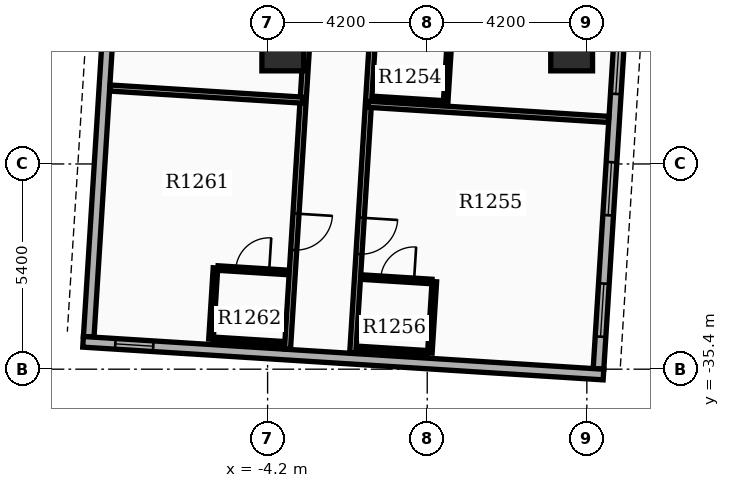
"""IFC4 building model, lengths in metres.
Left out: names, types, materials, properties, quantities, classifications, styles, units other than length and angle.
Written with IfcOpenShell. Run it as: python <this file> out.ifc"""

import sys

from ifc_helpers import new_model, si_unit, direction, frame, frame_2d, origin, origin_2d, place, context, subcontext, project, spatial, rectangle, extrude, element, fill, save


model = new_model("IFC4")
c1 = context("Model", 3, precision=1e-05, world=origin(), true_north=direction((0.0, 1.0)))
c2 = subcontext(c1, "Body", "Model", "MODEL_VIEW")
j1 = project(units=[si_unit("LENGTHUNIT", "METRE"), si_unit("PLANEANGLEUNIT", "RADIAN")], contexts=[c1])
p1 = place(None, origin())
s1 = spatial("IfcSite", under=j1, at=p1, CompositionType="ELEMENT")
p2 = place(p1, origin())
s2 = spatial("IfcBuilding", under=s1, at=p2, CompositionType="ELEMENT")
p3 = place(p2, frame((0.0, 0.0, 79.5)))
s3 = spatial("IfcBuildingStorey", under=s2, at=p3, CompositionType="ELEMENT", Elevation=79.5)
for number, where, z_axis, x_axis in (
    (1, (-3.8, -27.0, 0.0), (0.0, 0.0, 1.0), (1.0, 0.0, 0.0)),
    (2, (3.8, -27.0, 0.0), (0.0, 0.0, 1.0), (1.0, 0.0, 0.0)),
):
    element("IfcColumn", number, at=place(p3, frame(where, z_axis=z_axis, x_axis=x_axis)), inside=s3, PredefinedType="COLUMN", context=c2, shape_type="SweptSolid", body=[
        extrude(rectangle(XDim=1.1, YDim=1.1, at=origin_2d()), origin(), (0.0, 0.0, 1.0), 3.9),
    ])
p4 = place(p3, frame((-7.645, -14.489, 0.0), z_axis=(0.0, 0.0, 1.0), x_axis=(-0.06279645424, -0.99802635503, 0.0)))
e3 = element("IfcWall", 3, at=p4, inside=s3, PredefinedType="STANDARD", context=c2, shape_type="SweptSolid", body=[
    extrude(rectangle(XDim=20.1, YDim=0.28, at=frame_2d((10.05, 0.0))), origin(), (0.0, 0.0, 1.0), 2.91),
])
p5 = place(p4, frame((0.85, 0.0, 0.8)))
e4 = element("IfcOpeningElement", 4, at=p5, cuts=e3, PredefinedType="OPENING", context=c2, shape_type="SweptSolid", body=[
    extrude(rectangle(XDim=1.4, YDim=1.6, at=frame_2d((0.7, 0.8))), frame((0.0, 0.15, 0.0), z_axis=(0.0, -1.0, 0.0), x_axis=(1.0, 0.0, 0.0)), (0.0, 0.0, 1.0), 0.3),
])
p6 = place(p4, frame((4.05, 0.0, 0.8)))
e5 = element("IfcOpeningElement", 5, at=p6, cuts=e3, PredefinedType="OPENING", context=c2, shape_type="SweptSolid", body=[
    extrude(rectangle(XDim=1.4, YDim=1.6, at=frame_2d((0.7, 0.8))), frame((0.0, 0.15, 0.0), z_axis=(0.0, -1.0, 0.0), x_axis=(1.0, 0.0, 0.0)), (0.0, 0.0, 1.0), 0.3),
])
p7 = place(p4, frame((7.25, 0.0, 0.8)))
e6 = element("IfcOpeningElement", 6, at=p7, cuts=e3, PredefinedType="OPENING", context=c2, shape_type="SweptSolid", body=[
    extrude(rectangle(XDim=1.4, YDim=1.6, at=frame_2d((0.7, 0.8))), frame((0.0, 0.15, 0.0), z_axis=(0.0, -1.0, 0.0), x_axis=(1.0, 0.0, 0.0)), (0.0, 0.0, 1.0), 0.3),
])
p8 = place(p4, frame((10.45, 0.0, 0.8)))
e7 = element("IfcOpeningElement", 7, at=p8, cuts=e3, PredefinedType="OPENING", context=c2, shape_type="SweptSolid", body=[
    extrude(rectangle(XDim=1.4, YDim=1.6, at=frame_2d((0.7, 0.8))), frame((0.0, 0.15, 0.0), z_axis=(0.0, -1.0, 0.0), x_axis=(1.0, 0.0, 0.0)), (0.0, 0.0, 1.0), 0.3),
])
p9 = place(p3, frame((4.507, -35.393, 0.0), z_axis=(0.0, 0.0, 1.0), x_axis=(0.062784355807, 0.998027116198, 0.0)))
e8 = element("IfcWall", 8, at=p9, inside=s3, PredefinedType="STANDARD", context=c2, shape_type="SweptSolid", body=[
    extrude(rectangle(XDim=20.1, YDim=0.28, at=frame_2d((10.05, 0.0))), origin(), (0.0, 0.0, 1.0), 2.91),
])
p10 = place(p9, frame((0.85, 0.0, 0.8)))
e9 = element("IfcOpeningElement", 9, at=p10, cuts=e8, PredefinedType="OPENING", context=c2, shape_type="SweptSolid", body=[
    extrude(rectangle(XDim=1.4, YDim=1.6, at=frame_2d((0.7, 0.8))), frame((0.0, 0.15, 0.0), z_axis=(0.0, -1.0, 0.0), x_axis=(1.0, 0.0, 0.0)), (0.0, 0.0, 1.0), 0.3),
])
p11 = place(p9, frame((4.05, 0.0, 0.8)))
e10 = element("IfcOpeningElement", 10, at=p11, cuts=e8, PredefinedType="OPENING", context=c2, shape_type="SweptSolid", body=[
    extrude(rectangle(XDim=1.4, YDim=1.6, at=frame_2d((0.7, 0.8))), frame((0.0, 0.15, 0.0), z_axis=(0.0, -1.0, 0.0), x_axis=(1.0, 0.0, 0.0)), (0.0, 0.0, 1.0), 0.3),
])
p12 = place(p9, frame((7.25, 0.0, 0.8)))
e11 = element("IfcOpeningElement", 11, at=p12, cuts=e8, PredefinedType="OPENING", context=c2, shape_type="SweptSolid", body=[
    extrude(rectangle(XDim=1.4, YDim=1.6, at=frame_2d((0.7, 0.8))), frame((0.0, 0.15, 0.0), z_axis=(0.0, -1.0, 0.0), x_axis=(1.0, 0.0, 0.0)), (0.0, 0.0, 1.0), 0.3),
])
p13 = place(p9, frame((10.45, 0.0, 0.8)))
e12 = element("IfcOpeningElement", 12, at=p13, cuts=e8, PredefinedType="OPENING", context=c2, shape_type="SweptSolid", body=[
    extrude(rectangle(XDim=1.4, YDim=1.6, at=frame_2d((0.7, 0.8))), frame((0.0, 0.15, 0.0), z_axis=(0.0, -1.0, 0.0), x_axis=(1.0, 0.0, 0.0)), (0.0, 0.0, 1.0), 0.3),
])
p14 = place(p9, frame((14.035, 0.0, 0.85)))
e13 = element("IfcOpeningElement", 13, at=p14, cuts=e8, PredefinedType="OPENING", context=c2, shape_type="SweptSolid", body=[
    extrude(rectangle(XDim=1.2, YDim=1.6, at=frame_2d((0.6, 0.8))), frame((0.0, 0.15, 0.0), z_axis=(0.0, -1.0, 0.0), x_axis=(1.0, 0.0, 0.0)), (0.0, 0.0, 1.0), 0.3),
])
p15 = place(p3, frame((-9.055, -34.68, 0.0), z_axis=(0.0, 0.0, 1.0), x_axis=(0.998026318072, -0.062797041623, 0.0)))
e14 = element("IfcWall", 14, at=p15, inside=s3, PredefinedType="STANDARD", context=c2, shape_type="SweptSolid", body=[
    extrude(rectangle(XDim=13.72, YDim=0.28, at=frame_2d((6.86, 0.0))), origin(), (0.0, 0.0, 1.0), 2.91),
])
p16 = place(p15, frame((0.85, 0.0, 0.85)))
e15 = element("IfcOpeningElement", 15, at=p16, cuts=e14, PredefinedType="OPENING", context=c2, shape_type="SweptSolid", body=[
    extrude(rectangle(XDim=1.0, YDim=1.5, at=frame_2d((0.5, 0.75))), frame((0.0, 0.15, 0.0), z_axis=(0.0, -1.0, 0.0), x_axis=(1.0, 0.0, 0.0)), (0.0, 0.0, 1.0), 0.3),
])
p17 = place(p3, frame((-0.693, -14.836, 0.0), z_axis=(0.0, 0.0, 1.0), x_axis=(-0.062795509413, -0.998026414479, 0.0)))
e16 = element("IfcWall", 16, at=p17, inside=s3, PredefinedType="PARTITIONING", context=c2, shape_type="SweptSolid", body=[
    extrude(rectangle(XDim=20.182, YDim=0.16, at=frame_2d((10.091, 0.0))), origin(), (0.0, 0.0, 1.0), 2.9),
])
p18 = place(p17, frame((0.731, 0.0, 0.0)))
e17 = element("IfcOpeningElement", 17, at=p18, cuts=e16, PredefinedType="OPENING", context=c2, shape_type="SweptSolid", body=[
    extrude(rectangle(XDim=0.96, YDim=2.15, at=frame_2d((0.48, 1.075))), frame((0.0, 0.09, 0.0), z_axis=(0.0, -1.0, 0.0), x_axis=(1.0, 0.0, 0.0)), (0.0, 0.0, 1.0), 0.18),
])
p19 = place(p17, frame((7.896, 0.0, 0.0)))
e18 = element("IfcOpeningElement", 18, at=p19, cuts=e16, PredefinedType="OPENING", context=c2, shape_type="SweptSolid", body=[
    extrude(rectangle(XDim=0.96, YDim=2.15, at=frame_2d((0.48, 1.075))), frame((0.0, 0.09, 0.0), z_axis=(0.0, -1.0, 0.0), x_axis=(1.0, 0.0, 0.0)), (0.0, 0.0, 1.0), 0.18),
])
p20 = place(p17, frame((16.611, 0.0, 0.0)))
e19 = element("IfcOpeningElement", 19, at=p20, cuts=e16, PredefinedType="OPENING", context=c2, shape_type="SweptSolid", body=[
    extrude(rectangle(XDim=0.96, YDim=2.15, at=frame_2d((0.48, 1.075))), frame((0.0, 0.09, 0.0), z_axis=(0.0, -1.0, 0.0), x_axis=(1.0, 0.0, 0.0)), (0.0, 0.0, 1.0), 0.18),
])
p21 = place(p3, frame((-1.548, -28.43, 0.0), z_axis=(0.0, 0.0, 1.0), x_axis=(0.998027895917, -0.062771960074, 0.0)))
e20 = element("IfcWall", 20, at=p21, inside=s3, PredefinedType="PARTITIONING", context=c2, shape_type="SweptSolid", body=[
    extrude(rectangle(XDim=6.332, YDim=0.16, at=frame_2d((3.166, 0.0))), origin(), (0.0, 0.0, 1.0), 2.9),
])
p22 = place(p3, frame((-1.398, -28.279, 0.0), z_axis=(0.0, 0.0, 1.0), x_axis=(0.998027443946, -0.062779145668, 0.0)))
e21 = element("IfcWall", 21, at=p22, inside=s3, PredefinedType="PARTITIONING", context=c2, shape_type="SweptSolid", body=[
    extrude(rectangle(XDim=1.82, YDim=0.12, at=frame_2d((0.91, 0.0))), origin(), (0.0, 0.0, 1.0), 2.9),
])
p23 = place(p3, frame((0.601, -26.521, 0.0), z_axis=(0.0, 0.0, 1.0), x_axis=(-0.062717813936, -0.998031300018, 0.0)))
e22 = element("IfcWall", 22, at=p23, inside=s3, PredefinedType="PARTITIONING", context=c2, shape_type="SweptSolid", body=[
    extrude(rectangle(XDim=1.88, YDim=0.12, at=frame_2d((0.94, 0.0))), origin(), (0.0, 0.0, 1.0), 2.9),
])
p24 = place(p3, frame((-1.694, -32.979, 0.0), z_axis=(0.0, 0.0, 1.0), x_axis=(0.998027443946, -0.062779145668, 0.0)))
e23 = element("IfcWall", 23, at=p24, inside=s3, PredefinedType="PARTITIONING", context=c2, shape_type="SweptSolid", body=[
    extrude(rectangle(XDim=1.82, YDim=0.12, at=frame_2d((0.91, 0.0))), origin(), (0.0, 0.0, 1.0), 2.9),
])
p25 = place(p24, frame((0.47, 0.0, 0.0)))
e24 = element("IfcOpeningElement", 24, at=p25, cuts=e23, PredefinedType="OPENING", context=c2, shape_type="SweptSolid", body=[
    extrude(rectangle(XDim=0.88, YDim=2.1, at=frame_2d((0.44, 1.05))), frame((0.0, 0.07, 0.0), z_axis=(0.0, -1.0, 0.0), x_axis=(1.0, 0.0, 0.0)), (0.0, 0.0, 1.0), 0.14),
])
p26 = place(p3, frame((-1.812, -34.855, 0.0), z_axis=(0.0, 0.0, 1.0), x_axis=(0.998027443946, -0.062779145668, 0.0)))
e25 = element("IfcWall", 25, at=p26, inside=s3, PredefinedType="PARTITIONING", context=c2, shape_type="SweptSolid", body=[
    extrude(rectangle(XDim=1.82, YDim=0.12, at=frame_2d((0.91, 0.0))), origin(), (0.0, 0.0, 1.0), 2.9),
])
p27 = place(p3, frame((0.187, -33.097, 0.0), z_axis=(0.0, 0.0, 1.0), x_axis=(-0.062855297722, -0.998022650819, 0.0)))
e26 = element("IfcWall", 26, at=p27, inside=s3, PredefinedType="PARTITIONING", context=c2, shape_type="SweptSolid", body=[
    extrude(rectangle(XDim=1.88, YDim=0.12, at=frame_2d((0.94, 0.0))), origin(), (0.0, 0.0, 1.0), 2.9),
])
p28 = place(p3, frame((-2.409, -14.728, 0.0), z_axis=(0.0, 0.0, 1.0), x_axis=(-0.062795509413, -0.998026414479, 0.0)))
e27 = element("IfcWall", 27, at=p28, inside=s3, PredefinedType="PARTITIONING", context=c2, shape_type="SweptSolid", body=[
    extrude(rectangle(XDim=20.182, YDim=0.16, at=frame_2d((10.091, 0.0))), origin(), (0.0, 0.0, 1.0), 2.9),
])
p29 = place(p28, frame((2.636, 0.0, 0.0)))
e28 = element("IfcOpeningElement", 28, at=p29, cuts=e27, PredefinedType="OPENING", context=c2, shape_type="SweptSolid", body=[
    extrude(rectangle(XDim=0.96, YDim=2.15, at=frame_2d((0.48, 1.075))), frame((0.0, 0.09, 0.0), z_axis=(0.0, -1.0, 0.0), x_axis=(1.0, 0.0, 0.0)), (0.0, 0.0, 1.0), 0.18),
])
p30 = place(p28, frame((9.243, 0.0, 0.0)))
e29 = element("IfcOpeningElement", 29, at=p30, cuts=e27, PredefinedType="OPENING", context=c2, shape_type="SweptSolid", body=[
    extrude(rectangle(XDim=0.96, YDim=2.15, at=frame_2d((0.48, 1.075))), frame((0.0, 0.09, 0.0), z_axis=(0.0, -1.0, 0.0), x_axis=(1.0, 0.0, 0.0)), (0.0, 0.0, 1.0), 0.18),
])
p31 = place(p28, frame((16.611, 0.0, 0.0)))
e30 = element("IfcOpeningElement", 30, at=p31, cuts=e27, PredefinedType="OPENING", context=c2, shape_type="SweptSolid", body=[
    extrude(rectangle(XDim=0.96, YDim=2.15, at=frame_2d((0.48, 1.075))), frame((0.0, 0.09, 0.0), z_axis=(0.0, -1.0, 0.0), x_axis=(1.0, 0.0, 0.0)), (0.0, 0.0, 1.0), 0.18),
])
p32 = place(p3, frame((-3.265, -28.322, 0.0), z_axis=(0.0, 0.0, 1.0), x_axis=(-0.998025432585, 0.06281111298, 0.0)))
e31 = element("IfcWall", 31, at=p32, inside=s3, PredefinedType="PARTITIONING", context=c2, shape_type="SweptSolid", body=[
    extrude(rectangle(XDim=5.092, YDim=0.16, at=frame_2d((2.546, 0.0))), origin(), (0.0, 0.0, 1.0), 2.9),
])
p33 = place(p3, frame((-5.507, -32.739, 0.0), z_axis=(0.0, 0.0, 1.0), x_axis=(0.998027443946, -0.062779145668, 0.0)))
e32 = element("IfcWall", 32, at=p33, inside=s3, PredefinedType="PARTITIONING", context=c2, shape_type="SweptSolid", body=[
    extrude(rectangle(XDim=1.82, YDim=0.12, at=frame_2d((0.91, 0.0))), origin(), (0.0, 0.0, 1.0), 2.9),
])
p34 = place(p33, frame((0.47, 0.0, 0.0)))
e33 = element("IfcOpeningElement", 33, at=p34, cuts=e32, PredefinedType="OPENING", context=c2, shape_type="SweptSolid", body=[
    extrude(rectangle(XDim=0.88, YDim=2.1, at=frame_2d((0.44, 1.05))), frame((0.0, 0.07, 0.0), z_axis=(0.0, -1.0, 0.0), x_axis=(1.0, 0.0, 0.0)), (0.0, 0.0, 1.0), 0.14),
])
p35 = place(p3, frame((-5.625, -34.615, 0.0), z_axis=(0.0, 0.0, 1.0), x_axis=(0.998019030272, -0.062912758763, 0.0)))
e34 = element("IfcWall", 34, at=p35, inside=s3, PredefinedType="PARTITIONING", context=c2, shape_type="SweptSolid", body=[
    extrude(rectangle(XDim=1.82, YDim=0.12, at=frame_2d((0.91, 0.0))), origin(), (0.0, 0.0, 1.0), 2.9),
])
p36 = place(p3, frame((-5.571, -32.735, 0.0), z_axis=(0.0, 0.0, 1.0), x_axis=(-0.062855297722, -0.998022650819, 0.0)))
e35 = element("IfcWall", 35, at=p36, inside=s3, PredefinedType="PARTITIONING", context=c2, shape_type="SweptSolid", body=[
    extrude(rectangle(XDim=1.88, YDim=0.12, at=frame_2d((0.94, 0.0))), origin(), (0.0, 0.0, 1.0), 2.9),
])
p37 = place(p10, origin())
e36 = element("IfcWindow", 36, at=p37, inside=s3, PartitioningType="SINGLE_PANEL", PredefinedType="WINDOW", context=c2, shape_type="SweptSolid", body=[
    extrude(rectangle(XDim=1.4, YDim=1.6, at=frame_2d((0.7, 0.8))), frame((0.0, 0.03, 0.0), z_axis=(0.0, -1.0, 0.0), x_axis=(1.0, 0.0, 0.0)), (0.0, 0.0, 1.0), 0.06),
])
fill(e9, e36)
p38 = place(p11, origin())
e37 = element("IfcWindow", 37, at=p38, inside=s3, PartitioningType="SINGLE_PANEL", PredefinedType="WINDOW", context=c2, shape_type="SweptSolid", body=[
    extrude(rectangle(XDim=1.4, YDim=1.6, at=frame_2d((0.7, 0.8))), frame((0.0, 0.03, 0.0), z_axis=(0.0, -1.0, 0.0), x_axis=(1.0, 0.0, 0.0)), (0.0, 0.0, 1.0), 0.06),
])
fill(e10, e37)
p39 = place(p12, origin())
e38 = element("IfcWindow", 38, at=p39, inside=s3, PartitioningType="SINGLE_PANEL", PredefinedType="WINDOW", context=c2, shape_type="SweptSolid", body=[
    extrude(rectangle(XDim=1.4, YDim=1.6, at=frame_2d((0.7, 0.8))), frame((0.0, 0.03, 0.0), z_axis=(0.0, -1.0, 0.0), x_axis=(1.0, 0.0, 0.0)), (0.0, 0.0, 1.0), 0.06),
])
fill(e11, e38)
p40 = place(p16, origin())
e39 = element("IfcWindow", 39, at=p40, inside=s3, PartitioningType="SINGLE_PANEL", PredefinedType="WINDOW", context=c2, shape_type="SweptSolid", body=[
    extrude(rectangle(XDim=1.0, YDim=1.5, at=frame_2d((0.5, 0.75))), frame((0.0, 0.03, 0.0), z_axis=(0.0, -1.0, 0.0), x_axis=(1.0, 0.0, 0.0)), (0.0, 0.0, 1.0), 0.06),
])
fill(e15, e39)
p41 = place(p20, origin())
e40 = element("IfcDoor", 40, at=p41, inside=s3, OperationType="SINGLE_SWING_LEFT", PredefinedType="DOOR", context=c2, shape_type="SweptSolid", body=[
    extrude(rectangle(XDim=0.96, YDim=2.15, at=frame_2d((0.48, 1.075))), frame((0.0, 0.025, 0.0), z_axis=(0.0, -1.0, 0.0), x_axis=(1.0, 0.0, 0.0)), (0.0, 0.0, 1.0), 0.05),
])
fill(e19, e40)
p42 = place(p25, origin())
e41 = element("IfcDoor", 41, at=p42, inside=s3, OperationType="SINGLE_SWING_RIGHT", PredefinedType="DOOR", context=c2, shape_type="SweptSolid", body=[
    extrude(rectangle(XDim=0.88, YDim=2.1, at=frame_2d((0.44, 1.05))), frame((0.0, 0.025, 0.0), z_axis=(0.0, -1.0, 0.0), x_axis=(1.0, 0.0, 0.0)), (0.0, 0.0, 1.0), 0.05),
])
fill(e24, e41)
p43 = place(p31, origin())
e42 = element("IfcDoor", 42, at=p43, inside=s3, OperationType="SINGLE_SWING_LEFT", PredefinedType="DOOR", context=c2, shape_type="SweptSolid", body=[
    extrude(rectangle(XDim=0.96, YDim=2.15, at=frame_2d((0.48, 1.075))), frame((0.0, 0.025, 0.0), z_axis=(0.0, -1.0, 0.0), x_axis=(1.0, 0.0, 0.0)), (0.0, 0.0, 1.0), 0.05),
])
fill(e30, e42)
p44 = place(p34, origin())
e43 = element("IfcDoor", 43, at=p44, inside=s3, OperationType="SINGLE_SWING_RIGHT", PredefinedType="DOOR", context=c2, shape_type="SweptSolid", body=[
    extrude(rectangle(XDim=0.88, YDim=2.1, at=frame_2d((0.44, 1.05))), frame((0.0, 0.025, 0.0), z_axis=(0.0, -1.0, 0.0), x_axis=(1.0, 0.0, 0.0)), (0.0, 0.0, 1.0), 0.05),
])
fill(e33, e43)
save(model, sys.argv[1])
